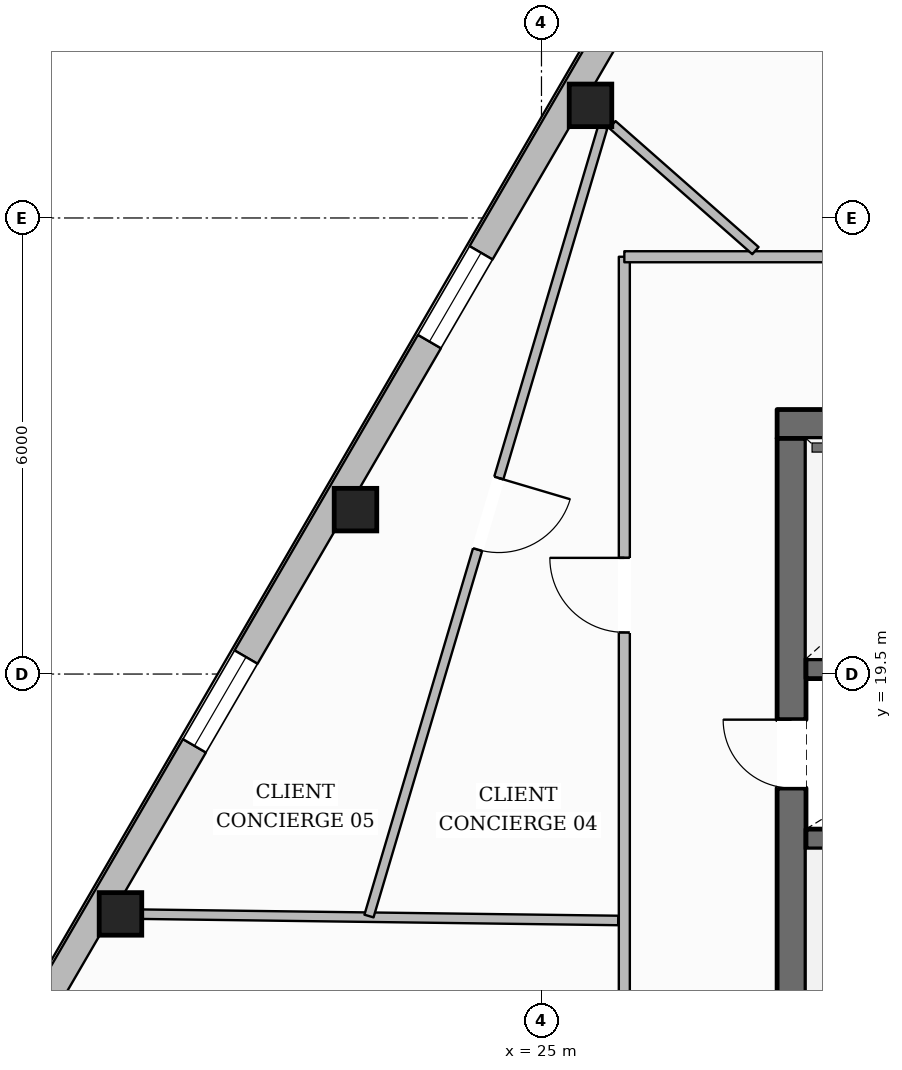
"""IFC4 building model, lengths in metres.
Left out: names, types, materials, properties, quantities, classifications, styles, units other than length and angle.
Written with IfcOpenShell. Run it as: python <this file> out.ifc"""

import sys

from ifc_helpers import new_model, si_unit, direction, frame, frame_2d, origin, origin_2d, place, context, subcontext, project, spatial, rectangle, hollow_rectangle, extrude, element, fill, save


model = new_model("IFC4")
c1 = context("Model", 3, precision=1e-05, world=origin(), true_north=direction((0.0, 1.0)))
c2 = subcontext(c1, "Body", "Model", "MODEL_VIEW")
j1 = project(units=[si_unit("LENGTHUNIT", "METRE"), si_unit("PLANEANGLEUNIT", "RADIAN")], contexts=[c1])
p1 = place(None, origin())
s1 = spatial("IfcSite", under=j1, at=p1, CompositionType="ELEMENT")
p2 = place(p1, origin())
s2 = spatial("IfcBuilding", under=s1, at=p2, CompositionType="ELEMENT")
p3 = place(p2, frame((0.0, 0.0, 266.45)))
s3 = spatial("IfcBuildingStorey", under=s2, at=p3, CompositionType="ELEMENT", Elevation=266.45)
p4 = place(p3, frame((28.1, 22.79, 0.0), z_axis=(0.0, 0.0, 1.0), x_axis=(1.0, 0.0, 0.0)))
e1 = element("IfcWall", 1, at=p4, inside=s3, PredefinedType="SOLIDWALL", context=c2, shape_type="SweptSolid", body=[
    extrude(rectangle(XDim=19.8, YDim=0.38, at=frame_2d((9.9, 0.0))), origin(), (0.0, 0.0, 1.0), 3.61),
])
p5 = place(p4, frame((6.175, 0.0, 0.0)))
e2 = element("IfcOpeningElement", 2, at=p5, cuts=e1, PredefinedType="OPENING", context=c2, shape_type="SweptSolid", body=[
    extrude(rectangle(XDim=1.05, YDim=2.15, at=frame_2d((0.525, 1.075))), frame((0.0, 0.2, 0.0), z_axis=(0.0, -1.0, 0.0), x_axis=(1.0, 0.0, 0.0)), (0.0, 0.0, 1.0), 0.4),
])
p6 = place(p4, frame((12.575, 0.0, 0.0)))
e3 = element("IfcOpeningElement", 3, at=p6, cuts=e1, PredefinedType="OPENING", context=c2, shape_type="SweptSolid", body=[
    extrude(rectangle(XDim=1.05, YDim=2.15, at=frame_2d((0.525, 1.075))), frame((0.0, 0.2, 0.0), z_axis=(0.0, -1.0, 0.0), x_axis=(1.0, 0.0, 0.0)), (0.0, 0.0, 1.0), 0.4),
])
p7 = place(p3, frame((28.29, 9.6, 0.0), z_axis=(0.0, 0.0, 1.0), x_axis=(0.0, 1.0, 0.0)))
e4 = element("IfcWall", 4, at=p7, inside=s3, PredefinedType="SOLIDWALL", context=c2, shape_type="SweptSolid", body=[
    extrude(rectangle(XDim=13.0, YDim=0.38, at=frame_2d((6.5, 0.0))), origin(), (0.0, 0.0, 1.0), 3.61),
])
p8 = place(p7, frame((0.2, 0.0, 0.0)))
e5 = element("IfcOpeningElement", 5, at=p8, cuts=e4, PredefinedType="OPENING", context=c2, shape_type="SweptSolid", body=[
    extrude(rectangle(XDim=1.1, YDim=2.15, at=frame_2d((0.55, 1.075))), frame((0.0, 0.2, 0.0), z_axis=(0.0, -1.0, 0.0), x_axis=(1.0, 0.0, 0.0)), (0.0, 0.0, 1.0), 0.4),
])
p9 = place(p7, frame((8.4, 0.0, 0.0)))
e6 = element("IfcOpeningElement", 6, at=p9, cuts=e4, PredefinedType="OPENING", context=c2, shape_type="SweptSolid", body=[
    extrude(rectangle(XDim=0.9, YDim=2.1, at=frame_2d((0.45, 1.05))), frame((0.0, 0.2, 0.0), z_axis=(0.0, -1.0, 0.0), x_axis=(1.0, 0.0, 0.0)), (0.0, 0.0, 1.0), 0.4),
])
for number, where, z_axis, x_axis in (
    (7, (28.48, 17.33, 0.0), (0.0, 0.0, 1.0), (1.0, 0.0, 0.0)),
    (8, (28.48, 19.57, 0.0), (0.0, 0.0, 1.0), (1.0, 0.0, 0.0)),
):
    element("IfcWall", number, at=place(p3, frame(where, z_axis=z_axis, x_axis=x_axis)), inside=s3, PredefinedType="SHEAR", context=c2, shape_type="SweptSolid", body=[
        extrude(rectangle(XDim=3.2, YDim=0.26, at=frame_2d((1.6, 0.0))), origin(), (0.0, 0.0, 1.0), 3.61),
    ])
for number, where, z_axis, x_axis in (
    (9, (25.645, 26.982, 0.0), (0.0, 0.0, 1.0), (1.0, 0.0, 0.0)),
    (10, (22.553, 21.663, 0.0), (0.0, 0.0, 1.0), (1.0, 0.0, 0.0)),
    (11, (19.461, 16.344, 0.0), (0.0, 0.0, 1.0), (1.0, 0.0, 0.0)),
):
    element("IfcColumn", number, at=place(p3, frame(where, z_axis=z_axis, x_axis=x_axis)), inside=s3, PredefinedType="COLUMN", context=c2, shape_type="SweptSolid", body=[
        extrude(hollow_rectangle(XDim=0.56, YDim=0.56, WallThickness=0.025, at=origin_2d()), origin(), (0.0, 0.0, 1.0), 3.61),
    ])
p10 = place(p3, frame((15.894, 10.745, 0.0), z_axis=(0.0, 0.0, 1.0), x_axis=(0.502581466224, 0.864529854781, 0.0)))
e12 = element("IfcWall", 12, at=p10, inside=s3, PredefinedType="STANDARD", context=c2, shape_type="SweptSolid", body=[
    extrude(rectangle(XDim=37.873, YDim=0.35, at=frame_2d((18.937, 0.0))), origin(), (0.0, 0.0, 1.0), 3.196),
])
p11 = place(p10, frame((33.643, 0.0, 0.65)))
e13 = element("IfcOpeningElement", 13, at=p11, cuts=e12, PredefinedType="OPENING", context=c2, shape_type="SweptSolid", body=[
    extrude(rectangle(XDim=1.35, YDim=1.75, at=frame_2d((0.675, 0.875))), frame((0.0, 0.185, 0.0), z_axis=(0.0, -1.0, 0.0), x_axis=(1.0, 0.0, 0.0)), (0.0, 0.0, 1.0), 0.37),
])
p12 = place(p10, frame((27.491, 0.0, 0.65)))
e14 = element("IfcOpeningElement", 14, at=p12, cuts=e12, PredefinedType="OPENING", context=c2, shape_type="SweptSolid", body=[
    extrude(rectangle(XDim=1.35, YDim=1.75, at=frame_2d((0.675, 0.875))), frame((0.0, 0.185, 0.0), z_axis=(0.0, -1.0, 0.0), x_axis=(1.0, 0.0, 0.0)), (0.0, 0.0, 1.0), 0.37),
])
p13 = place(p10, frame((15.187, 0.0, 0.65)))
e15 = element("IfcOpeningElement", 15, at=p13, cuts=e12, PredefinedType="OPENING", context=c2, shape_type="SweptSolid", body=[
    extrude(rectangle(XDim=1.35, YDim=1.75, at=frame_2d((0.675, 0.875))), frame((0.0, 0.185, 0.0), z_axis=(0.0, -1.0, 0.0), x_axis=(1.0, 0.0, 0.0)), (0.0, 0.0, 1.0), 0.37),
])
p14 = place(p10, frame((9.035, 0.0, 0.65)))
e16 = element("IfcOpeningElement", 16, at=p14, cuts=e12, PredefinedType="OPENING", context=c2, shape_type="SweptSolid", body=[
    extrude(rectangle(XDim=1.35, YDim=1.75, at=frame_2d((0.675, 0.875))), frame((0.0, 0.185, 0.0), z_axis=(0.0, -1.0, 0.0), x_axis=(1.0, 0.0, 0.0)), (0.0, 0.0, 1.0), 0.37),
])
p15 = place(p10, frame((2.883, 0.0, 0.65)))
e17 = element("IfcOpeningElement", 17, at=p15, cuts=e12, PredefinedType="OPENING", context=c2, shape_type="SweptSolid", body=[
    extrude(rectangle(XDim=1.35, YDim=1.75, at=frame_2d((0.675, 0.875))), frame((0.0, 0.185, 0.0), z_axis=(0.0, -1.0, 0.0), x_axis=(1.0, 0.0, 0.0)), (0.0, 0.0, 1.0), 0.37),
])
p16 = place(p3, frame((26.09, 7.21, 0.0), z_axis=(0.0, 0.0, 1.0), x_axis=(0.0, 1.0, 0.0)))
e18 = element("IfcWall", 18, at=p16, inside=s3, PredefinedType="PARTITIONING", context=c2, shape_type="SweptSolid", body=[
    extrude(rectangle(XDim=17.78, YDim=0.145, at=frame_2d((8.89, 0.0))), origin(), (0.0, 0.0, 1.0), 3.349),
])
p17 = place(p16, frame((12.838, 0.0, 0.0)))
e19 = element("IfcOpeningElement", 19, at=p17, cuts=e18, PredefinedType="OPENING", context=c2, shape_type="SweptSolid", body=[
    extrude(rectangle(XDim=0.98, YDim=2.15, at=frame_2d((0.49, 1.075))), frame((0.0, 0.083, 0.0), z_axis=(0.0, -1.0, 0.0), x_axis=(1.0, 0.0, 0.0)), (0.0, 0.0, 1.0), 0.165),
])
p18 = place(p16, frame((3.91, 0.0, 0.0)))
e20 = element("IfcOpeningElement", 20, at=p18, cuts=e18, PredefinedType="OPENING", context=c2, shape_type="SweptSolid", body=[
    extrude(rectangle(XDim=1.4, YDim=2.2, at=frame_2d((0.7, 1.1))), frame((0.0, 0.083, 0.0), z_axis=(0.0, -1.0, 0.0), x_axis=(1.0, 0.0, 0.0)), (0.0, 0.0, 1.0), 0.165),
])
p19 = place(p3, frame((26.09, 24.99, 0.0), z_axis=(0.0, 0.0, 1.0), x_axis=(1.0, 0.0, 0.0)))
e21 = element("IfcWall", 21, at=p19, inside=s3, PredefinedType="PARTITIONING", context=c2, shape_type="SweptSolid", body=[
    extrude(rectangle(XDim=17.11, YDim=0.145, at=frame_2d((8.555, 0.0))), origin(), (0.0, 0.0, 1.0), 3.61),
])
p20 = place(p19, frame((8.47, 0.0, 0.0)))
e22 = element("IfcOpeningElement", 22, at=p20, cuts=e21, PredefinedType="OPENING", context=c2, shape_type="SweptSolid", body=[
    extrude(rectangle(XDim=0.88, YDim=2.1, at=frame_2d((0.44, 1.05))), frame((0.0, 0.083, 0.0), z_axis=(0.0, -1.0, 0.0), x_axis=(1.0, 0.0, 0.0)), (0.0, 0.0, 1.0), 0.165),
])
p21 = place(p19, frame((10.99, 0.0, 0.0)))
e23 = element("IfcOpeningElement", 23, at=p21, cuts=e21, PredefinedType="OPENING", context=c2, shape_type="SweptSolid", body=[
    extrude(rectangle(XDim=0.88, YDim=2.1, at=frame_2d((0.44, 1.05))), frame((0.0, 0.083, 0.0), z_axis=(0.0, -1.0, 0.0), x_axis=(1.0, 0.0, 0.0)), (0.0, 0.0, 1.0), 0.165),
])
p22 = place(p19, frame((13.37, 0.0, 0.0)))
e24 = element("IfcOpeningElement", 24, at=p22, cuts=e21, PredefinedType="OPENING", context=c2, shape_type="SweptSolid", body=[
    extrude(rectangle(XDim=0.96, YDim=2.1, at=frame_2d((0.48, 1.05))), frame((0.0, 0.083, 0.0), z_axis=(0.0, -1.0, 0.0), x_axis=(1.0, 0.0, 0.0)), (0.0, 0.0, 1.0), 0.165),
])
p23 = place(p19, frame((4.253, 0.0, 0.0)))
e25 = element("IfcOpeningElement", 25, at=p23, cuts=e21, PredefinedType="OPENING", context=c2, shape_type="SweptSolid", body=[
    extrude(rectangle(XDim=0.98, YDim=2.15, at=frame_2d((0.49, 1.075))), frame((0.0, 0.083, 0.0), z_axis=(0.0, -1.0, 0.0), x_axis=(1.0, 0.0, 0.0)), (0.0, 0.0, 1.0), 0.165),
])
p24 = place(p3, frame((27.815, 25.071, 0.0), z_axis=(0.0, 0.0, 1.0), x_axis=(-0.750425677114, 0.660954841973, 0.0)))
e26 = element("IfcWall", 26, at=p24, inside=s3, PredefinedType="PARTITIONING", context=c2, shape_type="SweptSolid", body=[
    extrude(rectangle(XDim=2.508, YDim=0.125, at=frame_2d((1.254, 0.0))), origin(), (0.0, 0.0, 1.0), 3.61),
])
p25 = place(p3, frame((26.01, 16.258, 0.0), z_axis=(0.0, 0.0, 1.0), x_axis=(-0.99991313536, 0.013180354097, 0.0)))
e27 = element("IfcWall", 27, at=p25, inside=s3, PredefinedType="PARTITIONING", context=c2, shape_type="SweptSolid", body=[
    extrude(rectangle(XDim=6.261, YDim=0.125, at=frame_2d((3.13, 0.0))), origin(), (0.0, 0.0, 1.0), 3.246),
])
p26 = place(p3, frame((25.806, 26.694, 0.0), z_axis=(0.0, 0.0, 1.0), x_axis=(-0.28412826647, -0.958786278684, 0.0)))
e28 = element("IfcWall", 28, at=p26, inside=s3, PredefinedType="PARTITIONING", context=c2, shape_type="SweptSolid", body=[
    extrude(rectangle(XDim=10.823, YDim=0.125, at=frame_2d((5.412, 0.0))), origin(), (0.0, 0.0, 1.0), 3.349),
])
p27 = place(p26, frame((4.814, 0.0, 0.0)))
e29 = element("IfcOpeningElement", 29, at=p27, cuts=e28, PredefinedType="OPENING", context=c2, shape_type="SweptSolid", body=[
    extrude(rectangle(XDim=0.98, YDim=2.15, at=frame_2d((0.49, 1.075))), frame((0.0, 0.073, 0.0), z_axis=(0.0, -1.0, 0.0), x_axis=(1.0, 0.0, 0.0)), (0.0, 0.0, 1.0), 0.145),
])
p28 = place(p13, origin())
e30 = element("IfcWindow", 30, at=p28, inside=s3, PartitioningType="SINGLE_PANEL", PredefinedType="WINDOW", context=c2, shape_type="SweptSolid", body=[
    extrude(rectangle(XDim=1.35, YDim=1.75, at=frame_2d((0.675, 0.875))), frame((0.0, 0.03, 0.0), z_axis=(0.0, -1.0, 0.0), x_axis=(1.0, 0.0, 0.0)), (0.0, 0.0, 1.0), 0.06),
])
fill(e15, e30)
p29 = place(p14, origin())
e31 = element("IfcWindow", 31, at=p29, inside=s3, PartitioningType="SINGLE_PANEL", PredefinedType="WINDOW", context=c2, shape_type="SweptSolid", body=[
    extrude(rectangle(XDim=1.35, YDim=1.75, at=frame_2d((0.675, 0.875))), frame((0.0, 0.03, 0.0), z_axis=(0.0, -1.0, 0.0), x_axis=(1.0, 0.0, 0.0)), (0.0, 0.0, 1.0), 0.06),
])
fill(e16, e31)
p30 = place(p9, origin())
e32 = element("IfcDoor", 32, at=p30, inside=s3, OperationType="SINGLE_SWING_RIGHT", PredefinedType="DOOR", context=c2, shape_type="SweptSolid", body=[
    extrude(rectangle(XDim=0.9, YDim=2.1, at=frame_2d((0.45, 1.05))), frame((0.0, 0.025, 0.0), z_axis=(0.0, -1.0, 0.0), x_axis=(1.0, 0.0, 0.0)), (0.0, 0.0, 1.0), 0.05),
])
fill(e6, e32)
p31 = place(p17, origin())
e33 = element("IfcDoor", 33, at=p31, inside=s3, OperationType="SINGLE_SWING_RIGHT", PredefinedType="DOOR", context=c2, shape_type="SweptSolid", body=[
    extrude(rectangle(XDim=0.98, YDim=2.15, at=frame_2d((0.49, 1.075))), frame((0.0, 0.025, 0.0), z_axis=(0.0, -1.0, 0.0), x_axis=(1.0, 0.0, 0.0)), (0.0, 0.0, 1.0), 0.05),
])
fill(e19, e33)
p32 = place(p27, origin())
e34 = element("IfcDoor", 34, at=p32, inside=s3, OperationType="SINGLE_SWING_LEFT", PredefinedType="DOOR", context=c2, shape_type="SweptSolid", body=[
    extrude(rectangle(XDim=0.98, YDim=2.15, at=frame_2d((0.49, 1.075))), frame((0.0, 0.025, 0.0), z_axis=(0.0, -1.0, 0.0), x_axis=(1.0, 0.0, 0.0)), (0.0, 0.0, 1.0), 0.05),
])
fill(e29, e34)
save(model, sys.argv[1])
